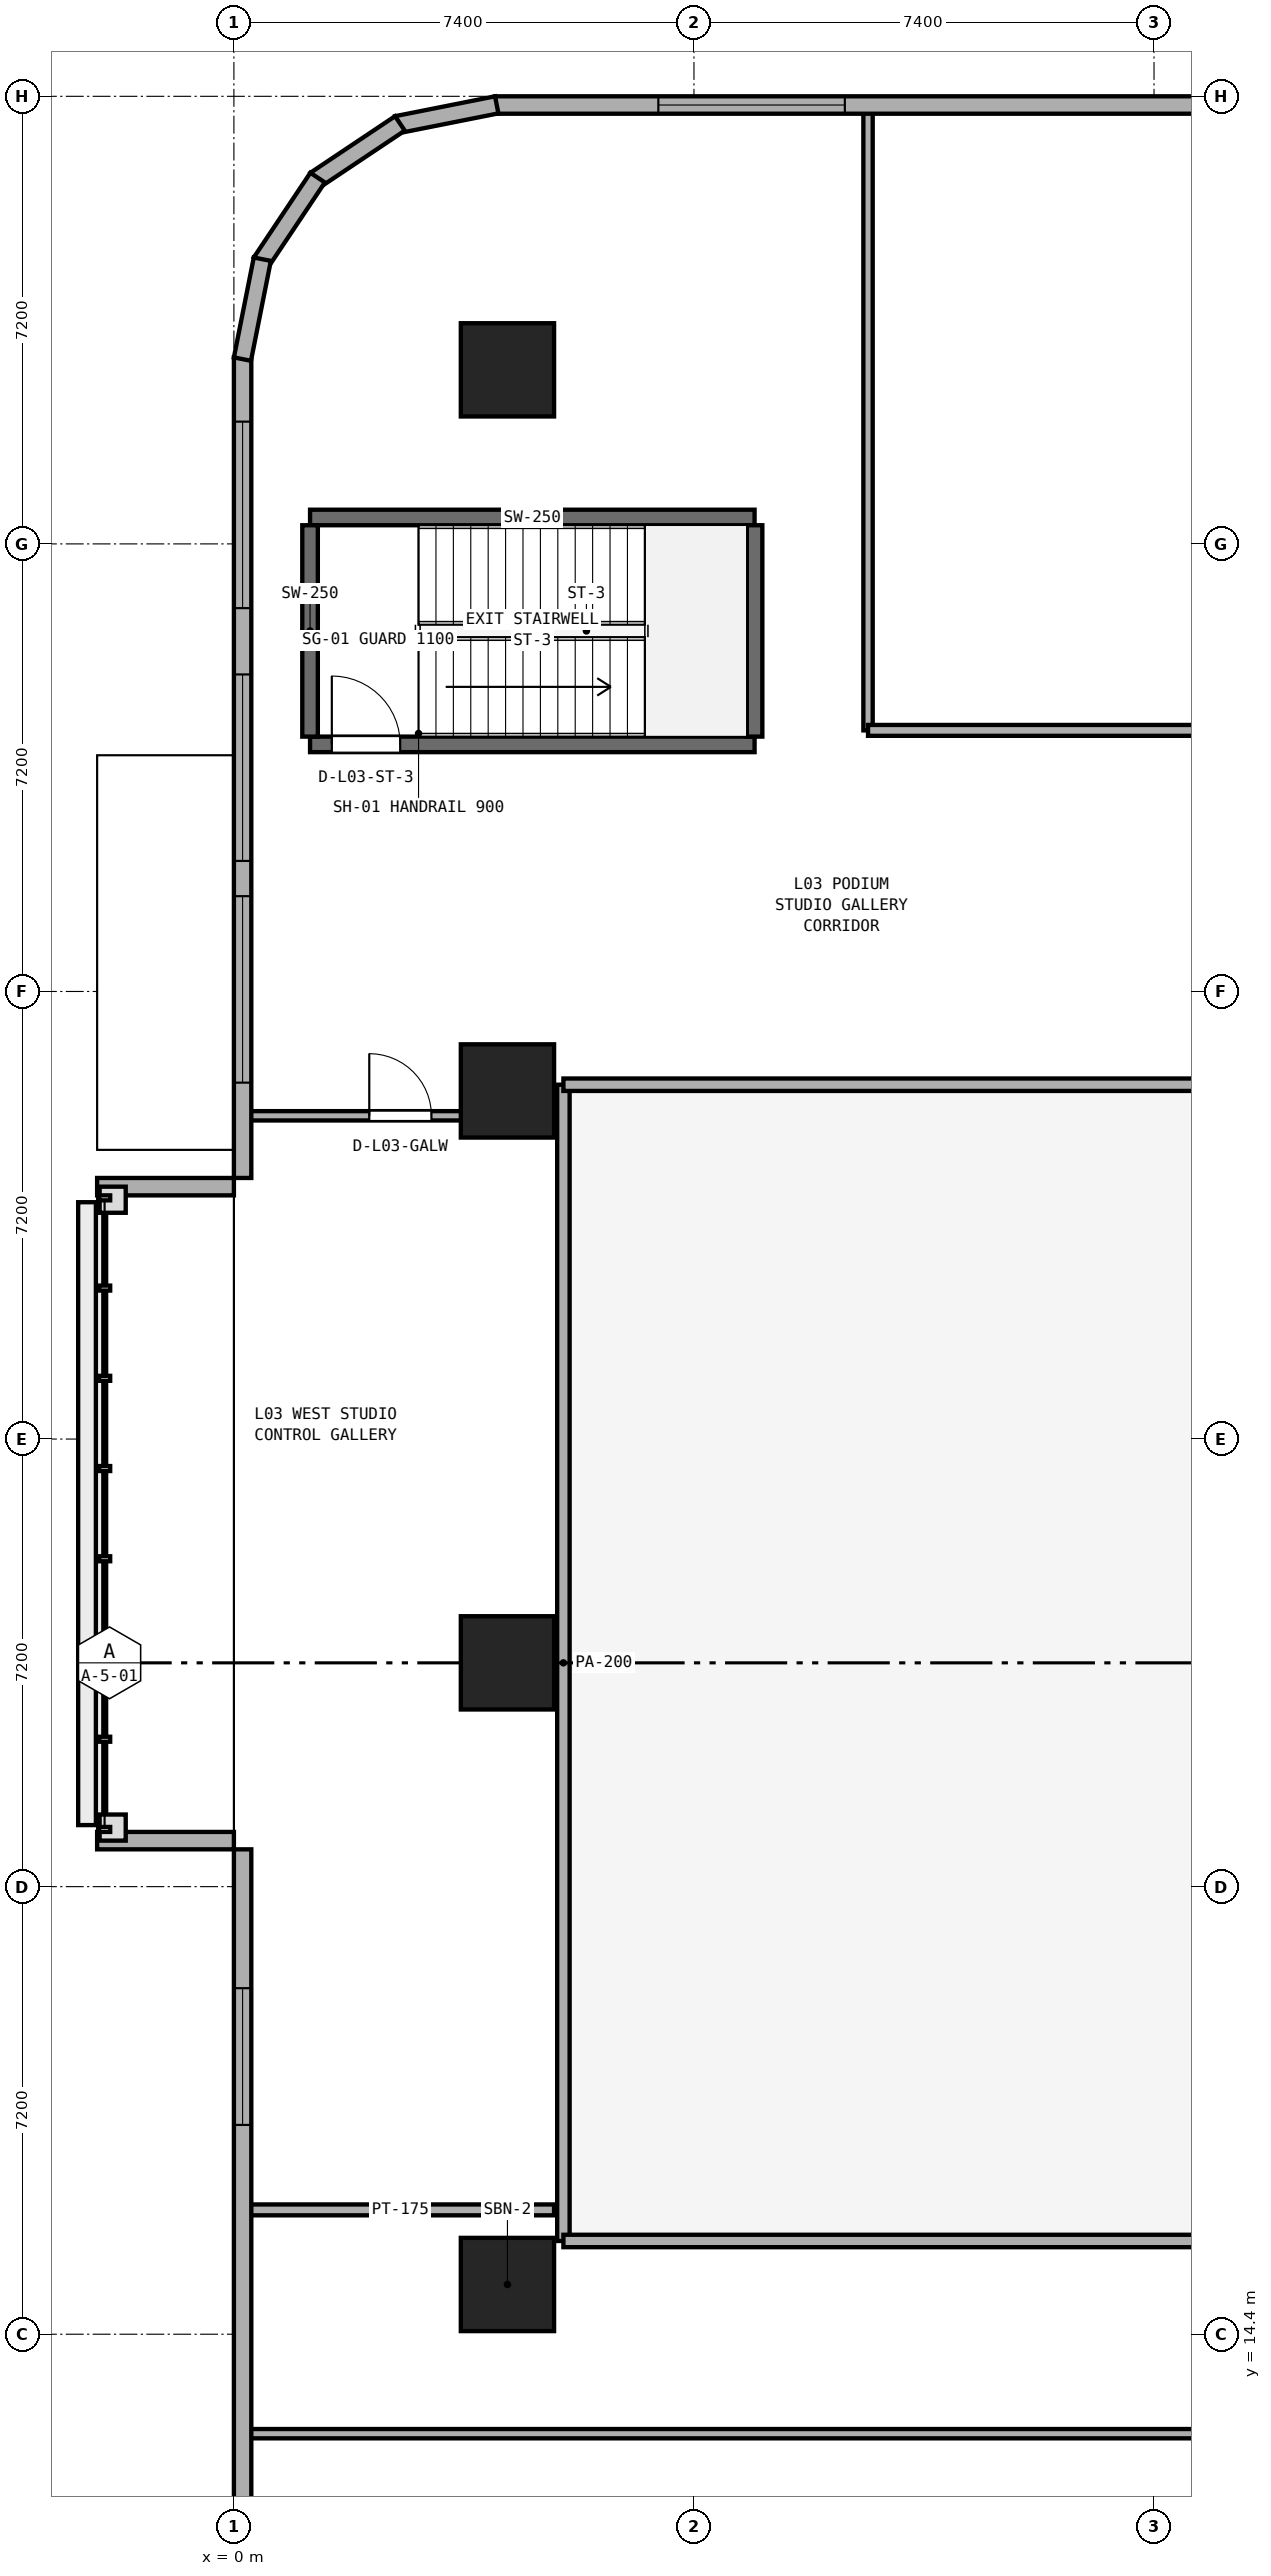
"""IFC4 building model, lengths in metres.
Left out: names, types, materials, properties, quantities, classifications, styles, units other than length and angle.
Written with IfcOpenShell. Run it as: python <this file> out.ifc"""

import sys

from ifc_helpers import new_model, si_unit, direction, frame, frame_2d, origin, origin_2d, place, context, subcontext, project, spatial, rectangle, extrude, element, fill, save


model = new_model("IFC4")
c1 = context("Model", 3, precision=1e-05, world=origin(), true_north=direction((0.0, 1.0)))
c2 = subcontext(c1, "Body", "Model", "MODEL_VIEW")
j1 = project(units=[si_unit("LENGTHUNIT", "METRE"), si_unit("PLANEANGLEUNIT", "RADIAN")], contexts=[c1])
p1 = place(None, origin())
s1 = spatial("IfcSite", under=j1, at=p1, CompositionType="ELEMENT")
p2 = place(p1, origin())
s2 = spatial("IfcBuilding", under=s1, at=p2, CompositionType="ELEMENT")
p3 = place(p2, frame((0.0, 0.0, 15.0)))
s3 = spatial("IfcBuildingStorey", under=s2, at=p3, CompositionType="ELEMENT", Elevation=15.0)
for number, where, z_axis, x_axis in (
    (1, (4.4, 46.0, 0.0), (0.0, 0.0, 1.0), (1.0, 0.0, 0.0)),
    (2, (4.4, 15.2, 0.0), (0.0, 0.0, 1.0), (1.0, 0.0, 0.0)),
    (3, (4.4, 25.2, 0.0), (0.0, 0.0, 1.0), (1.0, 0.0, 0.0)),
    (4, (4.4, 34.4, 0.0), (0.0, 0.0, 1.0), (1.0, 0.0, 0.0)),
):
    element("IfcColumn", number, at=place(p3, frame(where, z_axis=z_axis, x_axis=x_axis)), inside=s3, PredefinedType="COLUMN", context=c2, shape_type="SweptSolid", body=[
        extrude(rectangle(XDim=1.5, YDim=1.5, at=origin_2d()), origin(), (0.0, 0.0, 1.0), 5.0),
    ])
p4 = place(p3, frame((1.225, 39.975, 0.0), z_axis=(0.0, 0.0, 1.0), x_axis=(1.0, 0.0, 0.0)))
e5 = element("IfcWall", 5, at=p4, inside=s3, PredefinedType="SHEAR", context=c2, shape_type="SweptSolid", body=[
    extrude(rectangle(XDim=7.15, YDim=0.25, at=frame_2d((3.575, 0.0))), origin(), (0.0, 0.0, 1.0), 4.68),
])
p5 = place(p4, frame((0.35, 0.0, 0.0)))
e6 = element("IfcOpeningElement", 6, at=p5, cuts=e5, PredefinedType="OPENING", context=c2, shape_type="SweptSolid", body=[
    extrude(rectangle(XDim=1.1, YDim=2.15, at=frame_2d((0.55, 1.075))), frame((0.0, 0.135, 0.0), z_axis=(0.0, -1.0, 0.0), x_axis=(1.0, 0.0, 0.0)), (0.0, 0.0, 1.0), 0.27),
])
p6 = place(p3, frame((1.225, 43.625, 0.0), z_axis=(0.0, 0.0, 1.0), x_axis=(1.0, 0.0, 0.0)))
e7 = element("IfcWall", 7, at=p6, inside=s3, PredefinedType="SHEAR", context=c2, shape_type="SweptSolid", body=[
    extrude(rectangle(XDim=7.15, YDim=0.25, at=frame_2d((3.575, 0.0))), origin(), (0.0, 0.0, 1.0), 4.68),
])
for number, where, z_axis, x_axis in (
    (8, (1.225, 40.1, 0.0), (0.0, 0.0, 1.0), (0.0, 1.0, 0.0)),
    (9, (8.375, 40.1, 0.0), (0.0, 0.0, 1.0), (0.0, 1.0, 0.0)),
):
    element("IfcWall", number, at=place(p3, frame(where, z_axis=z_axis, x_axis=x_axis)), inside=s3, PredefinedType="SHEAR", context=c2, shape_type="SweptSolid", body=[
        extrude(rectangle(XDim=3.4, YDim=0.25, at=frame_2d((1.7, 0.0))), origin(), (0.0, 0.0, 1.0), 4.68),
    ])
p7 = place(p3, frame((5.3, 15.9, 0.0), z_axis=(0.0, 0.0, 1.0), x_axis=(0.0, 1.0, 0.0)))
e10 = element("IfcWall", 10, at=p7, inside=s3, PredefinedType="PARTITIONING", context=c2, shape_type="SweptSolid", body=[
    extrude(rectangle(XDim=18.6, YDim=0.2, at=frame_2d((9.3, 0.0))), origin(), (0.0, 0.0, 1.0), 4.68),
])
p8 = place(p3, frame((5.3, 15.9, 0.0), z_axis=(0.0, 0.0, 1.0), x_axis=(1.0, 0.0, 0.0)))
e11 = element("IfcWall", 11, at=p8, inside=s3, PredefinedType="PARTITIONING", context=c2, shape_type="SweptSolid", body=[
    extrude(rectangle(XDim=18.2, YDim=0.2, at=frame_2d((9.1, 0.0))), origin(), (0.0, 0.0, 1.0), 4.68),
])
p9 = place(p3, frame((5.3, 34.5, 0.0), z_axis=(0.0, 0.0, 1.0), x_axis=(1.0, 0.0, 0.0)))
e12 = element("IfcWall", 12, at=p9, inside=s3, PredefinedType="PARTITIONING", context=c2, shape_type="SweptSolid", body=[
    extrude(rectangle(XDim=18.2, YDim=0.2, at=frame_2d((9.1, 0.0))), origin(), (0.0, 0.0, 1.0), 3.91),
])
p10 = place(p3, frame((10.2, 40.2, 0.0), z_axis=(0.0, 0.0, 1.0), x_axis=(0.0, 1.0, 0.0)))
e13 = element("IfcWall", 13, at=p10, inside=s3, PredefinedType="PARTITIONING", context=c2, shape_type="SweptSolid", body=[
    extrude(rectangle(XDim=9.995, YDim=0.15, at=frame_2d((4.998, 0.0))), origin(), (0.0, 0.0, 1.0), 4.68),
])
p11 = place(p3, frame((0.205, 12.8, 0.0), z_axis=(0.0, 0.0, 1.0), x_axis=(1.0, 0.0, 0.0)))
e14 = element("IfcWall", 14, at=p11, inside=s3, PredefinedType="PARTITIONING", context=c2, shape_type="SweptSolid", body=[
    extrude(rectangle(XDim=73.59, YDim=0.15, at=frame_2d((36.795, 0.0))), origin(), (0.0, 0.0, 1.0), 4.68),
])
p12 = place(p11, frame((21.018, 0.0, 0.0)))
e15 = element("IfcOpeningElement", 15, at=p12, cuts=e14, PredefinedType="OPENING", context=c2, shape_type="SweptSolid", body=[
    extrude(rectangle(XDim=1.0, YDim=2.12, at=frame_2d((0.5, 1.06))), frame((0.0, 0.085, 0.0), z_axis=(0.0, -1.0, 0.0), x_axis=(1.0, 0.0, 0.0)), (0.0, 0.0, 1.0), 0.17),
])
p13 = place(p11, frame((57.573, 0.0, 0.0)))
e16 = element("IfcOpeningElement", 16, at=p13, cuts=e14, PredefinedType="OPENING", context=c2, shape_type="SweptSolid", body=[
    extrude(rectangle(XDim=1.0, YDim=2.12, at=frame_2d((0.5, 1.06))), frame((0.0, 0.085, 0.0), z_axis=(0.0, -1.0, 0.0), x_axis=(1.0, 0.0, 0.0)), (0.0, 0.0, 1.0), 0.17),
])
p14 = place(p3, frame((0.205, 16.4, 0.0), z_axis=(0.0, 0.0, 1.0), x_axis=(1.0, 0.0, 0.0)))
e17 = element("IfcWall", 17, at=p14, inside=s3, PredefinedType="PARTITIONING", context=c2, shape_type="SweptSolid", body=[
    extrude(rectangle(XDim=4.945, YDim=0.175, at=frame_2d((2.472, 0.0))), origin(), (0.0, 0.0, 1.0), 4.68),
])
p15 = place(p3, frame((0.205, 34.0, 0.0), z_axis=(0.0, 0.0, 1.0), x_axis=(1.0, 0.0, 0.0)))
e18 = element("IfcWall", 18, at=p15, inside=s3, PredefinedType="PARTITIONING", context=c2, shape_type="SweptSolid", body=[
    extrude(rectangle(XDim=4.945, YDim=0.15, at=frame_2d((2.472, 0.0))), origin(), (0.0, 0.0, 1.0), 3.78),
])
p16 = place(p15, frame((1.972, 0.0, 0.0)))
e19 = element("IfcOpeningElement", 19, at=p16, cuts=e18, PredefinedType="OPENING", context=c2, shape_type="SweptSolid", body=[
    extrude(rectangle(XDim=1.0, YDim=2.12, at=frame_2d((0.5, 1.06))), frame((0.0, 0.085, 0.0), z_axis=(0.0, -1.0, 0.0), x_axis=(1.0, 0.0, 0.0)), (0.0, 0.0, 1.0), 0.17),
])
p17 = place(p3, frame((10.2, 40.2, 0.0), z_axis=(0.0, 0.0, 1.0), x_axis=(1.0, 0.0, 0.0)))
e20 = element("IfcWall", 20, at=p17, inside=s3, PredefinedType="PARTITIONING", context=c2, shape_type="SweptSolid", body=[
    extrude(rectangle(XDim=54.0, YDim=0.175, at=frame_2d((27.0, 0.0))), origin(), (0.0, 0.0, 1.0), 4.68),
])
p18 = place(p17, frame((13.02, 0.0, 0.0)))
e21 = element("IfcOpeningElement", 21, at=p18, cuts=e20, PredefinedType="OPENING", context=c2, shape_type="SweptSolid", body=[
    extrude(rectangle(XDim=1.0, YDim=2.12, at=frame_2d((0.5, 1.06))), frame((0.0, 0.097, 0.0), z_axis=(0.0, -1.0, 0.0), x_axis=(1.0, 0.0, 0.0)), (0.0, 0.0, 1.0), 0.195),
])
p19 = place(p17, frame((39.78, 0.0, 0.0)))
e22 = element("IfcOpeningElement", 22, at=p19, cuts=e20, PredefinedType="OPENING", context=c2, shape_type="SweptSolid", body=[
    extrude(rectangle(XDim=1.0, YDim=2.12, at=frame_2d((0.5, 1.06))), frame((0.0, 0.097, 0.0), z_axis=(0.0, -1.0, 0.0), x_axis=(1.0, 0.0, 0.0)), (0.0, 0.0, 1.0), 0.195),
])
p20 = place(p3, frame((29.962, 50.26, 0.0), z_axis=(0.0, 0.0, 1.0), x_axis=(-1.0, 0.0, 0.0)))
e23 = element("IfcWall", 23, at=p20, inside=s3, PredefinedType="STANDARD", context=c2, shape_type="SweptSolid", body=[
    extrude(rectangle(XDim=25.762, YDim=0.28, at=frame_2d((12.881, 0.0))), origin(), (0.0, 0.0, 1.0), 4.68),
])
p21 = place(p20, frame((3.127, 0.0, 0.9)))
e24 = element("IfcOpeningElement", 24, at=p21, cuts=e23, PredefinedType="OPENING", context=c2, shape_type="SweptSolid", body=[
    extrude(rectangle(XDim=3.0, YDim=2.2, at=frame_2d((1.5, 1.1))), frame((0.0, 0.15, 0.0), z_axis=(0.0, -1.0, 0.0), x_axis=(1.0, 0.0, 0.0)), (0.0, 0.0, 1.0), 0.3),
])
p22 = place(p20, frame((11.381, 0.0, 0.9)))
e25 = element("IfcOpeningElement", 25, at=p22, cuts=e23, PredefinedType="OPENING", context=c2, shape_type="SweptSolid", body=[
    extrude(rectangle(XDim=3.0, YDim=2.2, at=frame_2d((1.5, 1.1))), frame((0.0, 0.15, 0.0), z_axis=(0.0, -1.0, 0.0), x_axis=(1.0, 0.0, 0.0)), (0.0, 0.0, 1.0), 0.3),
])
p23 = place(p20, frame((20.135, 0.0, 0.9)))
e26 = element("IfcOpeningElement", 26, at=p23, cuts=e23, PredefinedType="OPENING", context=c2, shape_type="SweptSolid", body=[
    extrude(rectangle(XDim=3.0, YDim=2.2, at=frame_2d((1.5, 1.1))), frame((0.0, 0.15, 0.0), z_axis=(0.0, -1.0, 0.0), x_axis=(1.0, 0.0, 0.0)), (0.0, 0.0, 1.0), 0.3),
])
p24 = place(p3, frame((0.14, 46.2, 0.0), z_axis=(0.0, 0.0, 1.0), x_axis=(0.0, -1.0, 0.0)))
e27 = element("IfcWall", 27, at=p24, inside=s3, PredefinedType="STANDARD", context=c2, shape_type="SweptSolid", body=[
    extrude(rectangle(XDim=13.2, YDim=0.28, at=frame_2d((6.6, 0.0))), origin(), (0.0, 0.0, 1.0), 3.78),
])
p25 = place(p24, frame((1.033, 0.0, 0.9)))
e28 = element("IfcOpeningElement", 28, at=p25, cuts=e27, PredefinedType="OPENING", context=c2, shape_type="SweptSolid", body=[
    extrude(rectangle(XDim=3.0, YDim=2.2, at=frame_2d((1.5, 1.1))), frame((0.0, 0.15, 0.0), z_axis=(0.0, -1.0, 0.0), x_axis=(1.0, 0.0, 0.0)), (0.0, 0.0, 1.0), 0.3),
])
p26 = place(p24, frame((5.1, 0.0, 0.9)))
e29 = element("IfcOpeningElement", 29, at=p26, cuts=e27, PredefinedType="OPENING", context=c2, shape_type="SweptSolid", body=[
    extrude(rectangle(XDim=3.0, YDim=2.2, at=frame_2d((1.5, 1.1))), frame((0.0, 0.15, 0.0), z_axis=(0.0, -1.0, 0.0), x_axis=(1.0, 0.0, 0.0)), (0.0, 0.0, 1.0), 0.3),
])
p27 = place(p24, frame((8.667, 0.0, 0.9)))
e30 = element("IfcOpeningElement", 30, at=p27, cuts=e27, PredefinedType="OPENING", context=c2, shape_type="SweptSolid", body=[
    extrude(rectangle(XDim=3.0, YDim=2.2, at=frame_2d((1.5, 1.1))), frame((0.0, 0.15, 0.0), z_axis=(0.0, -1.0, 0.0), x_axis=(1.0, 0.0, 0.0)), (0.0, 0.0, 1.0), 0.3),
])
p28 = place(p3, frame((0.14, 22.2, 0.0), z_axis=(0.0, 0.0, 1.0), x_axis=(0.0, -1.0, 0.0)))
e31 = element("IfcWall", 31, at=p28, inside=s3, PredefinedType="STANDARD", context=c2, shape_type="SweptSolid", body=[
    extrude(rectangle(XDim=18.0, YDim=0.28, at=frame_2d((9.0, 0.0))), origin(), (0.0, 0.0, 1.0), 3.78),
])
p29 = place(p28, frame((2.233, 0.0, 0.9)))
e32 = element("IfcOpeningElement", 32, at=p29, cuts=e31, PredefinedType="OPENING", context=c2, shape_type="SweptSolid", body=[
    extrude(rectangle(XDim=2.2, YDim=1.95, at=frame_2d((1.1, 0.975))), frame((0.0, 0.15, 0.0), z_axis=(0.0, -1.0, 0.0), x_axis=(1.0, 0.0, 0.0)), (0.0, 0.0, 1.0), 0.3),
])
p30 = place(p28, frame((13.567, 0.0, 0.9)))
e33 = element("IfcOpeningElement", 33, at=p30, cuts=e31, PredefinedType="OPENING", context=c2, shape_type="SweptSolid", body=[
    extrude(rectangle(XDim=2.2, YDim=1.95, at=frame_2d((1.1, 0.975))), frame((0.0, 0.15, 0.0), z_axis=(0.0, -1.0, 0.0), x_axis=(1.0, 0.0, 0.0)), (0.0, 0.0, 1.0), 0.3),
])
p31 = place(p3, frame((4.227, 50.263, 0.0), z_axis=(0.0, 0.0, 1.0), x_axis=(-0.980797825116, -0.195027244885, 0.0)))
e34 = element("IfcWall", 34, at=p31, inside=s3, PredefinedType="STANDARD", context=c2, shape_type="SweptSolid", body=[
    extrude(rectangle(XDim=1.639, YDim=0.28, at=frame_2d((0.819, 0.0))), origin(), (0.0, 0.0, 1.0), 4.68),
])
p32 = place(p3, frame((2.67, 49.964, 0.0), z_axis=(0.0, 0.0, 1.0), x_axis=(-0.831430845238, -0.555628247651, 0.0)))
e35 = element("IfcWall", 35, at=p32, inside=s3, PredefinedType="STANDARD", context=c2, shape_type="SweptSolid", body=[
    extrude(rectangle(XDim=1.638, YDim=0.28, at=frame_2d((0.819, 0.0))), origin(), (0.0, 0.0, 1.0), 4.68),
])
for number, where, z_axis, x_axis in (
    (36, (1.347, 49.092, 0.0), (0.0, 0.0, 1.0), (-0.556, -0.831, 0.0)),
    (37, (0.457, 47.78, 0.0), (0.0, 0.0, 1.0), (-0.195, -0.981, 0.0)),
):
    element("IfcWall", number, at=place(p3, frame(where, z_axis=z_axis, x_axis=x_axis)), inside=s3, PredefinedType="STANDARD", context=c2, shape_type="SweptSolid", body=[
        extrude(rectangle(XDim=1.639, YDim=0.28, at=frame_2d((0.819, 0.0))), origin(), (0.0, 0.0, 1.0), 4.68),
    ])
for number, where, z_axis, x_axis in (
    (38, (-2.2, 22.34, 0.0), (0.0, 0.0, 1.0), (1.0, 0.0, 0.0)),
    (39, (-2.2, 32.86, 0.0), (0.0, 0.0, 1.0), (1.0, 0.0, 0.0)),
):
    element("IfcWall", number, at=place(p3, frame(where, z_axis=z_axis, x_axis=x_axis)), inside=s3, PredefinedType="STANDARD", context=c2, shape_type="SweptSolid", body=[
        extrude(rectangle(XDim=2.2, YDim=0.28, at=frame_2d((1.1, 0.0))), origin(), (0.0, 0.0, 1.0), 3.987),
    ])
p33 = place(p5, origin())
e40 = element("IfcDoor", 40, at=p33, inside=s3, OperationType="SINGLE_SWING_LEFT", PredefinedType="DOOR", context=c2, shape_type="SweptSolid", body=[
    extrude(rectangle(XDim=1.1, YDim=2.15, at=frame_2d((0.55, 1.075))), frame((0.0, 0.025, 0.0), z_axis=(0.0, -1.0, 0.0), x_axis=(1.0, 0.0, 0.0)), (0.0, 0.0, 1.0), 0.05),
])
fill(e6, e40)
p34 = place(p16, origin())
e41 = element("IfcDoor", 41, at=p34, inside=s3, OperationType="SINGLE_SWING_LEFT", PredefinedType="DOOR", context=c2, shape_type="SweptSolid", body=[
    extrude(rectangle(XDim=1.0, YDim=2.12, at=frame_2d((0.5, 1.06))), frame((0.0, 0.025, 0.0), z_axis=(0.0, -1.0, 0.0), x_axis=(1.0, 0.0, 0.0)), (0.0, 0.0, 1.0), 0.05),
])
fill(e19, e41)
p35 = place(p23, origin())
e42 = element("IfcWindow", 42, at=p35, inside=s3, PartitioningType="SINGLE_PANEL", PredefinedType="WINDOW", context=c2, shape_type="SweptSolid", body=[
    extrude(rectangle(XDim=3.0, YDim=2.2, at=frame_2d((1.5, 1.1))), frame((0.0, 0.03, 0.0), z_axis=(0.0, -1.0, 0.0), x_axis=(1.0, 0.0, 0.0)), (0.0, 0.0, 1.0), 0.06),
])
fill(e26, e42)
p36 = place(p25, origin())
e43 = element("IfcWindow", 43, at=p36, inside=s3, PartitioningType="SINGLE_PANEL", PredefinedType="WINDOW", context=c2, shape_type="SweptSolid", body=[
    extrude(rectangle(XDim=3.0, YDim=2.2, at=frame_2d((1.5, 1.1))), frame((0.0, 0.03, 0.0), z_axis=(0.0, -1.0, 0.0), x_axis=(1.0, 0.0, 0.0)), (0.0, 0.0, 1.0), 0.06),
])
fill(e28, e43)
p37 = place(p26, origin())
e44 = element("IfcWindow", 44, at=p37, inside=s3, PartitioningType="SINGLE_PANEL", PredefinedType="WINDOW", context=c2, shape_type="SweptSolid", body=[
    extrude(rectangle(XDim=3.0, YDim=2.2, at=frame_2d((1.5, 1.1))), frame((0.0, 0.03, 0.0), z_axis=(0.0, -1.0, 0.0), x_axis=(1.0, 0.0, 0.0)), (0.0, 0.0, 1.0), 0.06),
])
fill(e29, e44)
p38 = place(p27, origin())
e45 = element("IfcWindow", 45, at=p38, inside=s3, PartitioningType="SINGLE_PANEL", PredefinedType="WINDOW", context=c2, shape_type="SweptSolid", body=[
    extrude(rectangle(XDim=3.0, YDim=2.2, at=frame_2d((1.5, 1.1))), frame((0.0, 0.03, 0.0), z_axis=(0.0, -1.0, 0.0), x_axis=(1.0, 0.0, 0.0)), (0.0, 0.0, 1.0), 0.06),
])
fill(e30, e45)
p39 = place(p29, origin())
e46 = element("IfcWindow", 46, at=p39, inside=s3, PartitioningType="SINGLE_PANEL", PredefinedType="WINDOW", context=c2, shape_type="SweptSolid", body=[
    extrude(rectangle(XDim=2.2, YDim=1.95, at=frame_2d((1.1, 0.975))), frame((0.0, 0.03, 0.0), z_axis=(0.0, -1.0, 0.0), x_axis=(1.0, 0.0, 0.0)), (0.0, 0.0, 1.0), 0.06),
])
fill(e32, e46)
save(model, sys.argv[1])
